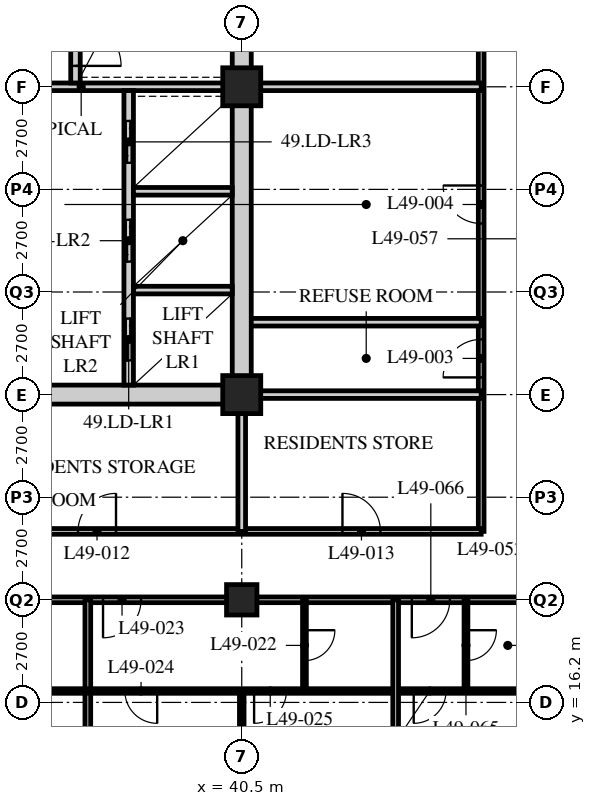
"""IFC4 building model, lengths in metres.
Left out: names, types, materials, properties, quantities, classifications, styles, units other than length and angle.
Written with IfcOpenShell. Run it as: python <this file> out.ifc"""

import sys

from ifc_helpers import new_model, si_unit, direction, frame, frame_2d, origin, origin_2d, place, context, subcontext, project, spatial, rectangle, hollow_rectangle, extrude, element, fill, save


model = new_model("IFC4")
c1 = context("Model", 3, precision=1e-05, world=origin(), true_north=direction((0.0, 1.0)))
c2 = subcontext(c1, "Body", "Model", "MODEL_VIEW")
j1 = project(units=[si_unit("LENGTHUNIT", "METRE"), si_unit("PLANEANGLEUNIT", "RADIAN")], contexts=[c1])
p1 = place(None, origin())
s1 = spatial("IfcSite", under=j1, at=p1, CompositionType="ELEMENT")
p2 = place(p1, origin())
s2 = spatial("IfcBuilding", under=s1, at=p2, CompositionType="ELEMENT")
p3 = place(p2, frame((0.0, 0.0, 192.0)))
s3 = spatial("IfcBuildingStorey", under=s2, at=p3, CompositionType="ELEMENT", Elevation=192.0)
p4 = place(p3, frame((40.5, 18.9, 0.0), z_axis=(0.0, 0.0, 1.0), x_axis=(1.0, 0.0, 0.0)))
e1 = element("IfcColumn", 1, at=p4, inside=s3, PredefinedType="COLUMN", context=c2, shape_type="SweptSolid", body=[
    extrude(hollow_rectangle(XDim=0.8, YDim=0.8, WallThickness=0.08, at=origin_2d()), origin(), (0.0, 0.0, 1.0), 3.6),
])
for number, where, z_axis, x_axis in (
    (2, (40.5, 24.3, 0.0), (0.0, 0.0, 1.0), (1.0, 0.0, 0.0)),
    (3, (40.5, 32.4, 0.0), (0.0, 0.0, 1.0), (1.0, 0.0, 0.0)),
):
    element("IfcColumn", number, at=place(p3, frame(where, z_axis=z_axis, x_axis=x_axis)), inside=s3, PredefinedType="COLUMN", context=c2, shape_type="SweptSolid", body=[
        extrude(hollow_rectangle(XDim=1.0, YDim=1.0, WallThickness=0.1, at=origin_2d()), origin(), (0.0, 0.0, 1.0), 3.6),
    ])
p5 = place(p3, frame((8.1, 18.9, 0.0), z_axis=(0.0, 0.0, 1.0), x_axis=(1.0, 0.0, 0.0)))
e4 = element("IfcWall", 4, at=p5, inside=s3, PredefinedType="PARTITIONING", context=c2, shape_type="SweptSolid", body=[
    extrude(rectangle(XDim=40.5, YDim=0.15, at=frame_2d((20.25, 0.0))), origin(), (0.0, 0.0, 1.0), 2.778),
])
p6 = place(p5, frame((4.45, 0.0, 0.0)))
e5 = element("IfcOpeningElement", 5, at=p6, cuts=e4, PredefinedType="OPENING", context=c2, shape_type="SweptSolid", body=[
    extrude(rectangle(XDim=1.0, YDim=2.1, at=frame_2d((0.5, 1.05))), frame((0.0, 0.085, 0.0), z_axis=(0.0, -1.0, 0.0), x_axis=(1.0, 0.0, 0.0)), (0.0, 0.0, 1.0), 0.17),
])
p7 = place(p5, frame((17.1, 0.0, 0.0)))
e6 = element("IfcOpeningElement", 6, at=p7, cuts=e4, PredefinedType="OPENING", context=c2, shape_type="SweptSolid", body=[
    extrude(rectangle(XDim=1.0, YDim=2.1, at=frame_2d((0.5, 1.05))), frame((0.0, 0.085, 0.0), z_axis=(0.0, -1.0, 0.0), x_axis=(1.0, 0.0, 0.0)), (0.0, 0.0, 1.0), 0.17),
])
p8 = place(p5, frame((28.75, 0.0, 0.0)))
e7 = element("IfcOpeningElement", 7, at=p8, cuts=e4, PredefinedType="OPENING", context=c2, shape_type="SweptSolid", body=[
    extrude(rectangle(XDim=1.0, YDim=2.1, at=frame_2d((0.5, 1.05))), frame((0.0, 0.085, 0.0), z_axis=(0.0, -1.0, 0.0), x_axis=(1.0, 0.0, 0.0)), (0.0, 0.0, 1.0), 0.17),
])
p9 = place(p5, frame((2.625, 0.0, 0.0)))
e8 = element("IfcOpeningElement", 8, at=p9, cuts=e4, PredefinedType="OPENING", context=c2, shape_type="SweptSolid", body=[
    extrude(rectangle(XDim=1.0, YDim=2.1, at=frame_2d((0.5, 1.05))), frame((0.0, 0.085, 0.0), z_axis=(0.0, -1.0, 0.0), x_axis=(1.0, 0.0, 0.0)), (0.0, 0.0, 1.0), 0.17),
])
p10 = place(p5, frame((36.875, 0.0, 0.0)))
e9 = element("IfcOpeningElement", 9, at=p10, cuts=e4, PredefinedType="OPENING", context=c2, shape_type="SweptSolid", body=[
    extrude(rectangle(XDim=1.0, YDim=2.1, at=frame_2d((0.5, 1.05))), frame((0.0, 0.085, 0.0), z_axis=(0.0, -1.0, 0.0), x_axis=(1.0, 0.0, 0.0)), (0.0, 0.0, 1.0), 0.17),
])
p11 = place(p3, frame((46.8, 20.7, 0.0), z_axis=(0.0, 0.0, 1.0), x_axis=(0.0, 1.0, 0.0)))
e10 = element("IfcWall", 10, at=p11, inside=s3, PredefinedType="PARTITIONING", context=c2, shape_type="SweptSolid", body=[
    extrude(rectangle(XDim=19.8, YDim=0.15, at=frame_2d((9.9, 0.0))), origin(), (0.0, 0.0, 1.0), 3.39),
])
p12 = place(p11, frame((4.052, 0.0, 0.0)))
e11 = element("IfcOpeningElement", 11, at=p12, cuts=e10, PredefinedType="OPENING", context=c2, shape_type="SweptSolid", body=[
    extrude(rectangle(XDim=1.0, YDim=2.1, at=frame_2d((0.5, 1.05))), frame((0.0, 0.085, 0.0), z_axis=(0.0, -1.0, 0.0), x_axis=(1.0, 0.0, 0.0)), (0.0, 0.0, 1.0), 0.17),
])
p13 = place(p11, frame((8.102, 0.0, 0.0)))
e12 = element("IfcOpeningElement", 12, at=p13, cuts=e10, PredefinedType="OPENING", context=c2, shape_type="SweptSolid", body=[
    extrude(rectangle(XDim=1.0, YDim=2.1, at=frame_2d((0.5, 1.05))), frame((0.0, 0.085, 0.0), z_axis=(0.0, -1.0, 0.0), x_axis=(1.0, 0.0, 0.0)), (0.0, 0.0, 1.0), 0.17),
])
p14 = place(p11, frame((13.502, 0.0, 0.0)))
e13 = element("IfcOpeningElement", 13, at=p14, cuts=e10, PredefinedType="OPENING", context=c2, shape_type="SweptSolid", body=[
    extrude(rectangle(XDim=1.0, YDim=2.1, at=frame_2d((0.5, 1.05))), frame((0.0, 0.085, 0.0), z_axis=(0.0, -1.0, 0.0), x_axis=(1.0, 0.0, 0.0)), (0.0, 0.0, 1.0), 0.17),
])
p15 = place(p11, frame((17.552, 0.0, 0.0)))
e14 = element("IfcOpeningElement", 14, at=p15, cuts=e10, PredefinedType="OPENING", context=c2, shape_type="SweptSolid", body=[
    extrude(rectangle(XDim=1.0, YDim=2.1, at=frame_2d((0.5, 1.05))), frame((0.0, 0.085, 0.0), z_axis=(0.0, -1.0, 0.0), x_axis=(1.0, 0.0, 0.0)), (0.0, 0.0, 1.0), 0.17),
])
p16 = place(p3, frame((29.56, 20.7, 0.0), z_axis=(0.0, 0.0, 1.0), x_axis=(1.0, 0.0, 0.0)))
e15 = element("IfcWall", 15, at=p16, inside=s3, PredefinedType="PARTITIONING", context=c2, shape_type="SweptSolid", body=[
    extrude(rectangle(XDim=17.24, YDim=0.15, at=frame_2d((8.62, 0.0))), origin(), (0.0, 0.0, 1.0), 3.39),
])
p17 = place(p16, frame((1.157, 0.0, 0.0)))
e16 = element("IfcOpeningElement", 16, at=p17, cuts=e15, PredefinedType="OPENING", context=c2, shape_type="SweptSolid", body=[
    extrude(rectangle(XDim=1.0, YDim=2.1, at=frame_2d((0.5, 1.05))), frame((0.0, 0.085, 0.0), z_axis=(0.0, -1.0, 0.0), x_axis=(1.0, 0.0, 0.0)), (0.0, 0.0, 1.0), 0.17),
])
p18 = place(p16, frame((6.632, 0.0, 0.0)))
e17 = element("IfcOpeningElement", 17, at=p18, cuts=e15, PredefinedType="OPENING", context=c2, shape_type="SweptSolid", body=[
    extrude(rectangle(XDim=1.0, YDim=2.1, at=frame_2d((0.5, 1.05))), frame((0.0, 0.085, 0.0), z_axis=(0.0, -1.0, 0.0), x_axis=(1.0, 0.0, 0.0)), (0.0, 0.0, 1.0), 0.17),
])
p19 = place(p16, frame((13.59, 0.0, 0.0)))
e18 = element("IfcOpeningElement", 18, at=p19, cuts=e15, PredefinedType="OPENING", context=c2, shape_type="SweptSolid", body=[
    extrude(rectangle(XDim=1.0, YDim=2.1, at=frame_2d((0.5, 1.05))), frame((0.0, 0.085, 0.0), z_axis=(0.0, -1.0, 0.0), x_axis=(1.0, 0.0, 0.0)), (0.0, 0.0, 1.0), 0.17),
])
for number, where, z_axis, x_axis in (
    (19, (40.5, 32.4, 0.0), (0.0, 0.0, 1.0), (1.0, 0.0, 0.0)),
    (20, (46.8, 26.205, 0.0), (0.0, 0.0, 1.0), (-1.0, 0.0, 0.0)),
):
    element("IfcWall", number, at=place(p3, frame(where, z_axis=z_axis, x_axis=x_axis)), inside=s3, PredefinedType="SOLIDWALL", context=c2, shape_type="SweptSolid", body=[
        extrude(rectangle(XDim=6.3, YDim=0.2, at=frame_2d((3.15, 0.0))), origin(), (0.0, 0.0, 1.0), 3.39),
    ])
p20 = place(p3, frame((40.5, 20.7, 0.0), z_axis=(0.0, 0.0, 1.0), x_axis=(0.0, 1.0, 0.0)))
e21 = element("IfcWall", 21, at=p20, inside=s3, PredefinedType="SOLIDWALL", context=c2, shape_type="SweptSolid", body=[
    extrude(rectangle(XDim=3.6, YDim=0.2, at=frame_2d((1.8, 0.0))), origin(), (0.0, 0.0, 1.0), 2.778),
])
p21 = place(p3, frame((40.5, 24.3, 0.0), z_axis=(0.0, 0.0, 1.0), x_axis=(1.0, 0.0, 0.0)))
e22 = element("IfcWall", 22, at=p21, inside=s3, PredefinedType="SOLIDWALL", context=c2, shape_type="SweptSolid", body=[
    extrude(rectangle(XDim=6.3, YDim=0.2, at=frame_2d((3.15, 0.0))), origin(), (0.0, 0.0, 1.0), 3.39),
])
p22 = place(p3, frame((36.45, 18.9, 0.0), z_axis=(0.0, 0.0, 1.0), x_axis=(0.0, -1.0, 0.0)))
e23 = element("IfcWall", 23, at=p22, inside=s3, PredefinedType="PARTITIONING", context=c2, shape_type="SweptSolid", body=[
    extrude(rectangle(XDim=7.8, YDim=0.15, at=frame_2d((3.9, 0.0))), origin(), (0.0, 0.0, 1.0), 3.39),
])
p23 = place(p3, frame((42.15, 18.9, 0.0), z_axis=(0.0, 0.0, 1.0), x_axis=(0.0, -1.0, 0.0)))
e24 = element("IfcWall", 24, at=p23, inside=s3, PredefinedType="PARTITIONING", context=c2, shape_type="SweptSolid", body=[
    extrude(rectangle(XDim=2.4, YDim=0.1, at=frame_2d((1.2, 0.0))), origin(), (0.0, 0.0, 1.0), 3.39),
])
p24 = place(p23, frame((0.8, 0.0, 0.0)))
e25 = element("IfcOpeningElement", 25, at=p24, cuts=e24, PredefinedType="OPENING", context=c2, shape_type="SweptSolid", body=[
    extrude(rectangle(XDim=0.8, YDim=2.1, at=frame_2d((0.4, 1.05))), frame((0.0, 0.06, 0.0), z_axis=(0.0, -1.0, 0.0), x_axis=(1.0, 0.0, 0.0)), (0.0, 0.0, 1.0), 0.12),
])
p25 = place(p3, frame((40.5, 16.5, 0.0), z_axis=(0.0, 0.0, 1.0), x_axis=(0.0, -1.0, 0.0)))
e26 = element("IfcWall", 26, at=p25, inside=s3, PredefinedType="PARTITIONING", context=c2, shape_type="SweptSolid", body=[
    extrude(rectangle(XDim=5.4, YDim=0.12, at=frame_2d((2.7, 0.0))), origin(), (0.0, 0.0, 1.0), 2.778),
])
p26 = place(p3, frame((8.1, 16.5, 0.0), z_axis=(0.0, 0.0, 1.0), x_axis=(1.0, 0.0, 0.0)))
e27 = element("IfcWall", 27, at=p26, inside=s3, PredefinedType="PARTITIONING", context=c2, shape_type="SweptSolid", body=[
    extrude(rectangle(XDim=40.5, YDim=0.12, at=frame_2d((20.25, 0.0))), origin(), (0.0, 0.0, 1.0), 3.39),
])
p27 = place(p26, frame((5.025, 0.0, 0.0)))
e28 = element("IfcOpeningElement", 28, at=p27, cuts=e27, PredefinedType="OPENING", context=c2, shape_type="SweptSolid", body=[
    extrude(rectangle(XDim=0.85, YDim=2.1, at=frame_2d((0.425, 1.05))), frame((0.0, 0.07, 0.0), z_axis=(0.0, -1.0, 0.0), x_axis=(1.0, 0.0, 0.0)), (0.0, 0.0, 1.0), 0.14),
])
p28 = place(p26, frame((12.475, 0.0, 0.0)))
e29 = element("IfcOpeningElement", 29, at=p28, cuts=e27, PredefinedType="OPENING", context=c2, shape_type="SweptSolid", body=[
    extrude(rectangle(XDim=0.85, YDim=2.1, at=frame_2d((0.425, 1.05))), frame((0.0, 0.07, 0.0), z_axis=(0.0, -1.0, 0.0), x_axis=(1.0, 0.0, 0.0)), (0.0, 0.0, 1.0), 0.14),
])
p29 = place(p26, frame((17.175, 0.0, 0.0)))
e30 = element("IfcOpeningElement", 30, at=p29, cuts=e27, PredefinedType="OPENING", context=c2, shape_type="SweptSolid", body=[
    extrude(rectangle(XDim=0.85, YDim=2.1, at=frame_2d((0.425, 1.05))), frame((0.0, 0.07, 0.0), z_axis=(0.0, -1.0, 0.0), x_axis=(1.0, 0.0, 0.0)), (0.0, 0.0, 1.0), 0.14),
])
p30 = place(p26, frame((24.625, 0.0, 0.0)))
e31 = element("IfcOpeningElement", 31, at=p30, cuts=e27, PredefinedType="OPENING", context=c2, shape_type="SweptSolid", body=[
    extrude(rectangle(XDim=0.85, YDim=2.1, at=frame_2d((0.425, 1.05))), frame((0.0, 0.07, 0.0), z_axis=(0.0, -1.0, 0.0), x_axis=(1.0, 0.0, 0.0)), (0.0, 0.0, 1.0), 0.14),
])
p31 = place(p26, frame((29.325, 0.0, 0.0)))
e32 = element("IfcOpeningElement", 32, at=p31, cuts=e27, PredefinedType="OPENING", context=c2, shape_type="SweptSolid", body=[
    extrude(rectangle(XDim=0.85, YDim=2.1, at=frame_2d((0.425, 1.05))), frame((0.0, 0.07, 0.0), z_axis=(0.0, -1.0, 0.0), x_axis=(1.0, 0.0, 0.0)), (0.0, 0.0, 1.0), 0.14),
])
p32 = place(p26, frame((32.725, 0.0, 0.0)))
e33 = element("IfcOpeningElement", 33, at=p32, cuts=e27, PredefinedType="OPENING", context=c2, shape_type="SweptSolid", body=[
    extrude(rectangle(XDim=0.85, YDim=2.1, at=frame_2d((0.425, 1.05))), frame((0.0, 0.07, 0.0), z_axis=(0.0, -1.0, 0.0), x_axis=(1.0, 0.0, 0.0)), (0.0, 0.0, 1.0), 0.14),
])
p33 = place(p26, frame((2.725, 0.0, 0.0)))
e34 = element("IfcOpeningElement", 34, at=p33, cuts=e27, PredefinedType="OPENING", context=c2, shape_type="SweptSolid", body=[
    extrude(rectangle(XDim=0.85, YDim=2.1, at=frame_2d((0.425, 1.05))), frame((0.0, 0.07, 0.0), z_axis=(0.0, -1.0, 0.0), x_axis=(1.0, 0.0, 0.0)), (0.0, 0.0, 1.0), 0.14),
])
p34 = place(p26, frame((36.925, 0.0, 0.0)))
e35 = element("IfcOpeningElement", 35, at=p34, cuts=e27, PredefinedType="OPENING", context=c2, shape_type="SweptSolid", body=[
    extrude(rectangle(XDim=0.85, YDim=2.1, at=frame_2d((0.425, 1.05))), frame((0.0, 0.07, 0.0), z_axis=(0.0, -1.0, 0.0), x_axis=(1.0, 0.0, 0.0)), (0.0, 0.0, 1.0), 0.14),
])
p35 = place(p3, frame((46.4, 18.9, 0.0), z_axis=(0.0, 0.0, 1.0), x_axis=(0.0, -1.0, 0.0)))
e36 = element("IfcWall", 36, at=p35, inside=s3, PredefinedType="PARTITIONING", context=c2, shape_type="SweptSolid", body=[
    extrude(rectangle(XDim=2.4, YDim=0.1, at=frame_2d((1.2, 0.0))), origin(), (0.0, 0.0, 1.0), 3.39),
])
p36 = place(p35, frame((0.8, 0.0, 0.0)))
e37 = element("IfcOpeningElement", 37, at=p36, cuts=e36, PredefinedType="OPENING", context=c2, shape_type="SweptSolid", body=[
    extrude(rectangle(XDim=0.8, YDim=2.1, at=frame_2d((0.4, 1.05))), frame((0.0, 0.06, 0.0), z_axis=(0.0, -1.0, 0.0), x_axis=(1.0, 0.0, 0.0)), (0.0, 0.0, 1.0), 0.12),
])
p37 = place(p3, frame((44.55, 18.9, 0.0), z_axis=(0.0, 0.0, 1.0), x_axis=(0.0, -1.0, 0.0)))
e38 = element("IfcWall", 38, at=p37, inside=s3, PredefinedType="PARTITIONING", context=c2, shape_type="SweptSolid", body=[
    extrude(rectangle(XDim=7.8, YDim=0.15, at=frame_2d((3.9, 0.0))), origin(), (0.0, 0.0, 1.0), 3.39),
])
p38 = place(p3, frame((15.95, 24.3, 0.0), z_axis=(0.0, 0.0, 1.0), x_axis=(1.0, 0.0, 0.0)))
e39 = element("IfcWall", 39, at=p38, inside=s3, PredefinedType="SOLIDWALL", context=c2, shape_type="SweptSolid", body=[
    extrude(rectangle(XDim=24.8, YDim=0.5, at=frame_2d((12.4, 0.0))), origin(), (0.0, 0.0, 1.0), 2.74),
])
p39 = place(p38, frame((11.5, 0.0, 0.0)))
e40 = element("IfcOpeningElement", 40, at=p39, cuts=e39, PredefinedType="OPENING", context=c2, shape_type="SweptSolid", body=[
    extrude(rectangle(XDim=1.8, YDim=2.4, at=frame_2d((0.9, 1.2))), frame((0.0, 0.26, 0.0), z_axis=(0.0, -1.0, 0.0), x_axis=(1.0, 0.0, 0.0)), (0.0, 0.0, 1.0), 0.52),
])
p40 = place(p3, frame((40.5, 24.55, 0.0), z_axis=(0.0, 0.0, 1.0), x_axis=(0.0, 1.0, 0.0)))
e41 = element("IfcWall", 41, at=p40, inside=s3, PredefinedType="SOLIDWALL", context=c2, shape_type="SweptSolid", body=[
    extrude(rectangle(XDim=15.7, YDim=0.5, at=frame_2d((7.85, 0.0))), origin(), (0.0, 0.0, 1.0), 2.778),
])
p41 = place(p3, frame((32.3, 32.4, 0.0), z_axis=(0.0, 0.0, 1.0), x_axis=(1.0, 0.0, 0.0)))
e42 = element("IfcWall", 42, at=p41, inside=s3, PredefinedType="SOLIDWALL", context=c2, shape_type="SweptSolid", body=[
    extrude(rectangle(XDim=7.95, YDim=0.2, at=frame_2d((3.975, 0.0))), origin(), (0.0, 0.0, 1.0), 2.778),
])
p42 = place(p3, frame((37.525, 24.55, 0.0), z_axis=(0.0, 0.0, 1.0), x_axis=(0.0, 1.0, 0.0)))
e43 = element("IfcWall", 43, at=p42, inside=s3, PredefinedType="SOLIDWALL", context=c2, shape_type="SweptSolid", body=[
    extrude(rectangle(XDim=7.75, YDim=0.25, at=frame_2d((3.875, 0.0))), origin(), (0.0, 0.0, 1.0), 3.39),
])
p43 = place(p42, frame((0.65, 0.0, 0.0)))
e44 = element("IfcOpeningElement", 44, at=p43, cuts=e43, PredefinedType="OPENING", context=c2, shape_type="SweptSolid", body=[
    extrude(rectangle(XDim=1.1, YDim=2.4, at=frame_2d((0.55, 1.2))), frame((0.0, 0.135, 0.0), z_axis=(0.0, -1.0, 0.0), x_axis=(1.0, 0.0, 0.0)), (0.0, 0.0, 1.0), 0.27),
])
p44 = place(p42, frame((3.25, 0.0, 0.0)))
e45 = element("IfcOpeningElement", 45, at=p44, cuts=e43, PredefinedType="OPENING", context=c2, shape_type="SweptSolid", body=[
    extrude(rectangle(XDim=1.1, YDim=2.4, at=frame_2d((0.55, 1.2))), frame((0.0, 0.135, 0.0), z_axis=(0.0, -1.0, 0.0), x_axis=(1.0, 0.0, 0.0)), (0.0, 0.0, 1.0), 0.27),
])
p45 = place(p42, frame((5.85, 0.0, 0.0)))
e46 = element("IfcOpeningElement", 46, at=p45, cuts=e43, PredefinedType="OPENING", context=c2, shape_type="SweptSolid", body=[
    extrude(rectangle(XDim=1.1, YDim=2.4, at=frame_2d((0.55, 1.2))), frame((0.0, 0.135, 0.0), z_axis=(0.0, -1.0, 0.0), x_axis=(1.0, 0.0, 0.0)), (0.0, 0.0, 1.0), 0.27),
])
for number, where, z_axis, x_axis in (
    (47, (37.65, 27.05, 0.0), (0.0, 0.0, 1.0), (1.0, 0.0, 0.0)),
    (48, (37.65, 29.65, 0.0), (0.0, 0.0, 1.0), (1.0, 0.0, 0.0)),
):
    element("IfcWall", number, at=place(p3, frame(where, z_axis=z_axis, x_axis=x_axis)), inside=s3, PredefinedType="SOLIDWALL", context=c2, shape_type="SweptSolid", body=[
        extrude(rectangle(XDim=2.6, YDim=0.2, at=frame_2d((1.3, 0.0))), origin(), (0.0, 0.0, 1.0), 3.39),
    ])
p46 = place(p3, frame((36.125, 32.5, 0.0), z_axis=(0.0, 0.0, 1.0), x_axis=(0.0, 1.0, 0.0)))
e49 = element("IfcWall", 49, at=p46, inside=s3, PredefinedType="SOLIDWALL", context=c2, shape_type="SweptSolid", body=[
    extrude(rectangle(XDim=7.75, YDim=0.25, at=frame_2d((3.875, 0.0))), origin(), (0.0, 0.0, 1.0), 3.39),
])
p47 = place(p46, frame((0.45, 0.0, 0.0)))
e50 = element("IfcOpeningElement", 50, at=p47, cuts=e49, PredefinedType="OPENING", context=c2, shape_type="SweptSolid", body=[
    extrude(rectangle(XDim=1.2, YDim=2.1, at=frame_2d((0.6, 1.05))), frame((0.0, 0.135, 0.0), z_axis=(0.0, -1.0, 0.0), x_axis=(1.0, 0.0, 0.0)), (0.0, 0.0, 1.0), 0.27),
])
p48 = place(p12, origin())
e51 = element("IfcDoor", 51, at=p48, inside=s3, OperationType="SINGLE_SWING_LEFT", PredefinedType="DOOR", context=c2, shape_type="SweptSolid", body=[
    extrude(rectangle(XDim=1.0, YDim=2.1, at=frame_2d((0.5, 1.05))), frame((0.0, 0.025, 0.0), z_axis=(0.0, -1.0, 0.0), x_axis=(1.0, 0.0, 0.0)), (0.0, 0.0, 1.0), 0.05),
])
fill(e11, e51)
p49 = place(p13, origin())
e52 = element("IfcDoor", 52, at=p49, inside=s3, OperationType="SINGLE_SWING_RIGHT", PredefinedType="DOOR", context=c2, shape_type="SweptSolid", body=[
    extrude(rectangle(XDim=1.0, YDim=2.1, at=frame_2d((0.5, 1.05))), frame((0.0, 0.025, 0.0), z_axis=(0.0, -1.0, 0.0), x_axis=(1.0, 0.0, 0.0)), (0.0, 0.0, 1.0), 0.05),
])
fill(e12, e52)
p50 = place(p18, origin())
e53 = element("IfcDoor", 53, at=p50, inside=s3, OperationType="SINGLE_SWING_RIGHT", PredefinedType="DOOR", context=c2, shape_type="SweptSolid", body=[
    extrude(rectangle(XDim=1.0, YDim=2.1, at=frame_2d((0.5, 1.05))), frame((0.0, 0.025, 0.0), z_axis=(0.0, -1.0, 0.0), x_axis=(1.0, 0.0, 0.0)), (0.0, 0.0, 1.0), 0.05),
])
fill(e17, e53)
p51 = place(p19, origin())
e54 = element("IfcDoor", 54, at=p51, inside=s3, OperationType="SINGLE_SWING_LEFT", PredefinedType="DOOR", context=c2, shape_type="SweptSolid", body=[
    extrude(rectangle(XDim=1.0, YDim=2.1, at=frame_2d((0.5, 1.05))), frame((0.0, 0.025, 0.0), z_axis=(0.0, -1.0, 0.0), x_axis=(1.0, 0.0, 0.0)), (0.0, 0.0, 1.0), 0.05),
])
fill(e18, e54)
p52 = place(p24, origin())
e55 = element("IfcDoor", 55, at=p52, inside=s3, OperationType="SINGLE_SWING_LEFT", PredefinedType="DOOR", context=c2, shape_type="SweptSolid", body=[
    extrude(rectangle(XDim=0.8, YDim=2.1, at=frame_2d((0.4, 1.05))), frame((0.0, 0.025, 0.0), z_axis=(0.0, -1.0, 0.0), x_axis=(1.0, 0.0, 0.0)), (0.0, 0.0, 1.0), 0.05),
])
fill(e25, e55)
p53 = place(p8, origin())
e56 = element("IfcDoor", 56, at=p53, inside=s3, OperationType="SINGLE_SWING_RIGHT", PredefinedType="DOOR", context=c2, shape_type="SweptSolid", body=[
    extrude(rectangle(XDim=1.0, YDim=2.1, at=frame_2d((0.5, 1.05))), frame((0.0, 0.025, 0.0), z_axis=(0.0, -1.0, 0.0), x_axis=(1.0, 0.0, 0.0)), (0.0, 0.0, 1.0), 0.05),
])
fill(e7, e56)
p54 = place(p31, origin())
e57 = element("IfcDoor", 57, at=p54, inside=s3, OperationType="SINGLE_SWING_LEFT", PredefinedType="DOOR", context=c2, shape_type="SweptSolid", body=[
    extrude(rectangle(XDim=0.85, YDim=2.1, at=frame_2d((0.425, 1.05))), frame((0.0, 0.025, 0.0), z_axis=(0.0, -1.0, 0.0), x_axis=(1.0, 0.0, 0.0)), (0.0, 0.0, 1.0), 0.05),
])
fill(e32, e57)
p55 = place(p32, origin())
e58 = element("IfcDoor", 58, at=p55, inside=s3, OperationType="SINGLE_SWING_RIGHT", PredefinedType="DOOR", context=c2, shape_type="SweptSolid", body=[
    extrude(rectangle(XDim=0.85, YDim=2.1, at=frame_2d((0.425, 1.05))), frame((0.0, 0.025, 0.0), z_axis=(0.0, -1.0, 0.0), x_axis=(1.0, 0.0, 0.0)), (0.0, 0.0, 1.0), 0.05),
])
fill(e33, e58)
p56 = place(p36, origin())
e59 = element("IfcDoor", 59, at=p56, inside=s3, OperationType="SINGLE_SWING_LEFT", PredefinedType="DOOR", context=c2, shape_type="SweptSolid", body=[
    extrude(rectangle(XDim=0.8, YDim=2.1, at=frame_2d((0.4, 1.05))), frame((0.0, 0.025, 0.0), z_axis=(0.0, -1.0, 0.0), x_axis=(1.0, 0.0, 0.0)), (0.0, 0.0, 1.0), 0.05),
])
fill(e37, e59)
p57 = place(p10, origin())
e60 = element("IfcDoor", 60, at=p57, inside=s3, OperationType="SINGLE_SWING_RIGHT", PredefinedType="DOOR", context=c2, shape_type="SweptSolid", body=[
    extrude(rectangle(XDim=1.0, YDim=2.1, at=frame_2d((0.5, 1.05))), frame((0.0, 0.025, 0.0), z_axis=(0.0, -1.0, 0.0), x_axis=(1.0, 0.0, 0.0)), (0.0, 0.0, 1.0), 0.05),
])
fill(e9, e60)
p58 = place(p34, origin())
e61 = element("IfcDoor", 61, at=p58, inside=s3, OperationType="SINGLE_SWING_RIGHT", PredefinedType="DOOR", context=c2, shape_type="SweptSolid", body=[
    extrude(rectangle(XDim=0.85, YDim=2.1, at=frame_2d((0.425, 1.05))), frame((0.0, 0.025, 0.0), z_axis=(0.0, -1.0, 0.0), x_axis=(1.0, 0.0, 0.0)), (0.0, 0.0, 1.0), 0.05),
])
fill(e35, e61)
p59 = place(p47, origin())
e62 = element("IfcDoor", 62, at=p59, inside=s3, OperationType="SINGLE_SWING_RIGHT", PredefinedType="DOOR", context=c2, shape_type="SweptSolid", body=[
    extrude(rectangle(XDim=1.2, YDim=2.1, at=frame_2d((0.6, 1.05))), frame((0.0, 0.025, 0.0), z_axis=(0.0, -1.0, 0.0), x_axis=(1.0, 0.0, 0.0)), (0.0, 0.0, 1.0), 0.05),
])
fill(e50, e62)
p60 = place(p43, origin())
e63 = element("IfcDoor", 63, at=p60, inside=s3, OperationType="DOUBLE_DOOR_SLIDING", PredefinedType="DOOR", context=c2, shape_type="SweptSolid", body=[
    extrude(rectangle(XDim=1.1, YDim=2.4, at=frame_2d((0.55, 1.2))), frame((0.0, 0.025, 0.0), z_axis=(0.0, -1.0, 0.0), x_axis=(1.0, 0.0, 0.0)), (0.0, 0.0, 1.0), 0.05),
])
fill(e44, e63)
p61 = place(p44, origin())
e64 = element("IfcDoor", 64, at=p61, inside=s3, OperationType="DOUBLE_DOOR_SLIDING", PredefinedType="DOOR", context=c2, shape_type="SweptSolid", body=[
    extrude(rectangle(XDim=1.1, YDim=2.4, at=frame_2d((0.55, 1.2))), frame((0.0, 0.025, 0.0), z_axis=(0.0, -1.0, 0.0), x_axis=(1.0, 0.0, 0.0)), (0.0, 0.0, 1.0), 0.05),
])
fill(e45, e64)
p62 = place(p45, origin())
e65 = element("IfcDoor", 65, at=p62, inside=s3, OperationType="DOUBLE_DOOR_SLIDING", PredefinedType="DOOR", context=c2, shape_type="SweptSolid", body=[
    extrude(rectangle(XDim=1.1, YDim=2.4, at=frame_2d((0.55, 1.2))), frame((0.0, 0.025, 0.0), z_axis=(0.0, -1.0, 0.0), x_axis=(1.0, 0.0, 0.0)), (0.0, 0.0, 1.0), 0.05),
])
fill(e46, e65)
save(model, sys.argv[1])
